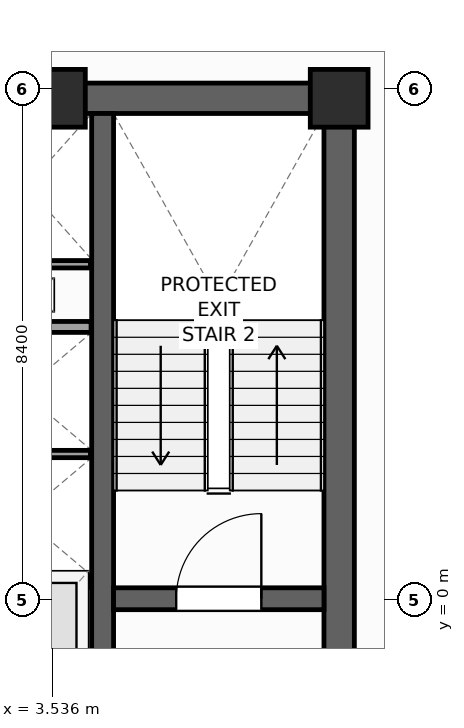
"""IFC4 building model, lengths in metres.
Left out: names, types, materials, properties, quantities, classifications, styles, units other than length and angle.
Written with IfcOpenShell. Run it as: python <this file> out.ifc"""

import sys

from ifc_helpers import new_model, si_unit, direction, frame, frame_2d, origin, origin_2d, place, context, subcontext, project, spatial, rectangle, extrude, source, transform, mapped, element, fill, save


model = new_model("IFC4")
c1 = context("Model", 3, precision=1e-05, world=origin(), true_north=direction((0.0, 1.0)))
c2 = subcontext(c1, "Body", "Model", "MODEL_VIEW")
j1 = project(units=[si_unit("LENGTHUNIT", "METRE"), si_unit("PLANEANGLEUNIT", "RADIAN")], contexts=[c1])
p1 = place(None, origin())
s1 = spatial("IfcSite", under=j1, at=p1, CompositionType="ELEMENT")
p2 = place(p1, origin())
s2 = spatial("IfcBuilding", under=s1, at=p2, CompositionType="ELEMENT")
p3 = place(p2, frame((0.0, 0.0, 221.2)))
s3 = spatial("IfcBuildingStorey", under=s2, at=p3, CompositionType="ELEMENT", Elevation=221.2)
p4 = place(p3, frame((-8.5, 8.25, 0.0), z_axis=(0.0, 0.0, 1.0), x_axis=(1.0, 0.0, 0.0)))
e1 = element("IfcWall", 1, at=p4, inside=s3, PredefinedType="SHEAR", context=c2, shape_type="SweptSolid", body=[
    extrude(rectangle(XDim=17.0, YDim=0.5, at=frame_2d((8.5, 0.0))), origin(), (0.0, 0.0, 1.0), 3.9),
])
p5 = place(p3, frame((8.25, -8.0, 0.0), z_axis=(0.0, 0.0, 1.0), x_axis=(0.0, 1.0, 0.0)))
e2 = element("IfcWall", 2, at=p5, inside=s3, PredefinedType="SHEAR", context=c2, shape_type="SweptSolid", body=[
    extrude(rectangle(XDim=16.0, YDim=0.5, at=frame_2d((8.0, 0.0))), origin(), (0.0, 0.0, 1.0), 3.9),
])
p6 = place(p5, frame((4.69, 0.0, 0.0)))
e3 = element("IfcOpeningElement", 3, at=p6, cuts=e2, PredefinedType="OPENING", context=c2, shape_type="SweptSolid", body=[
    extrude(rectangle(XDim=1.3, YDim=2.2, at=frame_2d((0.65, 1.1))), frame((0.0, 0.26, 0.0), z_axis=(0.0, -1.0, 0.0), x_axis=(1.0, 0.0, 0.0)), (0.0, 0.0, 1.0), 0.52),
])
p7 = place(p3, frame((4.36, -8.0, 0.0), z_axis=(0.0, 0.0, 1.0), x_axis=(0.0, 1.0, 0.0)))
e4 = element("IfcWall", 4, at=p7, inside=s3, PredefinedType="SHEAR", context=c2, shape_type="SweptSolid", body=[
    extrude(rectangle(XDim=16.0, YDim=0.36, at=frame_2d((8.0, 0.0))), origin(), (0.0, 0.0, 1.0), 3.9),
])
p8 = place(p3, frame((4.54, 0.02, 0.0), z_axis=(0.0, 0.0, 1.0), x_axis=(1.0, 0.0, 0.0)))
e5 = element("IfcWall", 5, at=p8, inside=s3, PredefinedType="SHEAR", context=c2, shape_type="SweptSolid", body=[
    extrude(rectangle(XDim=3.46, YDim=0.36, at=frame_2d((1.73, 0.0))), origin(), (0.0, 0.0, 1.0), 3.9),
])
p9 = place(p8, frame((1.03, 0.0, 0.0)))
e6 = element("IfcOpeningElement", 6, at=p9, cuts=e5, PredefinedType="OPENING", context=c2, shape_type="SweptSolid", body=[
    extrude(rectangle(XDim=1.4, YDim=2.2, at=frame_2d((0.7, 1.1))), frame((0.0, 0.19, 0.0), z_axis=(0.0, -1.0, 0.0), x_axis=(1.0, 0.0, 0.0)), (0.0, 0.0, 1.0), 0.38),
])
m1 = source(origin(), c2, "Body", "SweptSolid", [
    extrude(rectangle(XDim=0.95, YDim=0.95, at=origin_2d()), origin(), (0.0, 0.0, 1.0), 3.9),
])
for number, where, z_axis, x_axis in (
    (7, (8.25, 8.25, 0.0), (0.0, 0.0, 1.0), (1.0, 0.0, 0.0)),
    (8, (3.6, 8.25, 0.0), (0.0, 0.0, 1.0), (1.0, 0.0, 0.0)),
):
    element("IfcColumn", number, at=place(p3, frame(where, z_axis=z_axis, x_axis=x_axis)), inside=s3, PredefinedType="PILASTER", context=c2, shape_type="MappedRepresentation", body=[
        mapped(m1, transform((0.0, 0.0, 0.0), scale=1.0)),
    ])
p10 = place(p3, frame((6.733, -29.154, 0.0), z_axis=(0.0, 0.0, 1.0), x_axis=(0.629325378072, 0.77714192302, 0.0)))
e9 = element("IfcWall", 9, at=p10, inside=s3, PredefinedType="STANDARD", context=c2, shape_type="SweptSolid", body=[
    extrude(rectangle(XDim=36.84, YDim=0.34, at=frame_2d((18.42, 0.0))), origin(), (0.0, 0.0, 1.0), 2.96),
])
p11 = place(p10, frame((23.495, 0.0, 0.0)))
e10 = element("IfcOpeningElement", 10, at=p11, cuts=e9, PredefinedType="OPENING", context=c2, shape_type="SweptSolid", body=[
    extrude(rectangle(XDim=1.05, YDim=2.25, at=frame_2d((0.525, 1.125))), frame((0.0, 0.18, 0.0), z_axis=(0.0, -1.0, 0.0), x_axis=(1.0, 0.0, 0.0)), (0.0, 0.0, 1.0), 0.36),
])
p12 = place(p10, frame((3.721, 0.0, 0.48)))
e11 = element("IfcOpeningElement", 11, at=p12, cuts=e9, PredefinedType="OPENING", context=c2, shape_type="SweptSolid", body=[
    extrude(rectangle(XDim=1.4, YDim=2.4, at=frame_2d((0.7, 1.2))), frame((0.0, 0.18, 0.0), z_axis=(0.0, -1.0, 0.0), x_axis=(1.0, 0.0, 0.0)), (0.0, 0.0, 1.0), 0.36),
])
p13 = place(p10, frame((10.559, 0.0, 0.58)))
e12 = element("IfcOpeningElement", 12, at=p13, cuts=e9, PredefinedType="OPENING", context=c2, shape_type="SweptSolid", body=[
    extrude(rectangle(XDim=1.75, YDim=2.3, at=frame_2d((0.875, 1.15))), frame((0.0, 0.18, 0.0), z_axis=(0.0, -1.0, 0.0), x_axis=(1.0, 0.0, 0.0)), (0.0, 0.0, 1.0), 0.36),
])
p14 = place(p10, frame((16.058, 0.0, 0.58)))
e13 = element("IfcOpeningElement", 13, at=p14, cuts=e9, PredefinedType="OPENING", context=c2, shape_type="SweptSolid", body=[
    extrude(rectangle(XDim=1.75, YDim=2.3, at=frame_2d((0.875, 1.15))), frame((0.0, 0.18, 0.0), z_axis=(0.0, -1.0, 0.0), x_axis=(1.0, 0.0, 0.0)), (0.0, 0.0, 1.0), 0.36),
])
p15 = place(p10, frame((25.676, 0.0, 0.58)))
e14 = element("IfcOpeningElement", 14, at=p15, cuts=e9, PredefinedType="OPENING", context=c2, shape_type="SweptSolid", body=[
    extrude(rectangle(XDim=1.75, YDim=2.3, at=frame_2d((0.875, 1.15))), frame((0.0, 0.18, 0.0), z_axis=(0.0, -1.0, 0.0), x_axis=(1.0, 0.0, 0.0)), (0.0, 0.0, 1.0), 0.36),
])
p16 = place(p10, frame((31.732, 0.0, 0.48)))
e15 = element("IfcOpeningElement", 15, at=p16, cuts=e9, PredefinedType="OPENING", context=c2, shape_type="SweptSolid", body=[
    extrude(rectangle(XDim=1.4, YDim=2.4, at=frame_2d((0.7, 1.2))), frame((0.0, 0.18, 0.0), z_axis=(0.0, -1.0, 0.0), x_axis=(1.0, 0.0, 0.0)), (0.0, 0.0, 1.0), 0.36),
])
p17 = place(p3, frame((29.154, 6.733, 0.0), z_axis=(0.0, 0.0, 1.0), x_axis=(-0.77714192302, 0.629325378072, 0.0)))
e16 = element("IfcWall", 16, at=p17, inside=s3, PredefinedType="STANDARD", context=c2, shape_type="SweptSolid", body=[
    extrude(rectangle(XDim=36.84, YDim=0.34, at=frame_2d((18.42, 0.0))), origin(), (0.0, 0.0, 1.0), 2.96),
])
p18 = place(p17, frame((3.721, 0.0, 0.48)))
e17 = element("IfcOpeningElement", 17, at=p18, cuts=e16, PredefinedType="OPENING", context=c2, shape_type="SweptSolid", body=[
    extrude(rectangle(XDim=1.4, YDim=2.4, at=frame_2d((0.7, 1.2))), frame((0.0, 0.18, 0.0), z_axis=(0.0, -1.0, 0.0), x_axis=(1.0, 0.0, 0.0)), (0.0, 0.0, 1.0), 0.36),
])
p19 = place(p17, frame((9.809, 0.0, 0.58)))
e18 = element("IfcOpeningElement", 18, at=p19, cuts=e16, PredefinedType="OPENING", context=c2, shape_type="SweptSolid", body=[
    extrude(rectangle(XDim=1.75, YDim=2.3, at=frame_2d((0.875, 1.15))), frame((0.0, 0.18, 0.0), z_axis=(0.0, -1.0, 0.0), x_axis=(1.0, 0.0, 0.0)), (0.0, 0.0, 1.0), 0.36),
])
p20 = place(p17, frame((16.058, 0.0, 0.58)))
e19 = element("IfcOpeningElement", 19, at=p20, cuts=e16, PredefinedType="OPENING", context=c2, shape_type="SweptSolid", body=[
    extrude(rectangle(XDim=1.75, YDim=2.3, at=frame_2d((0.875, 1.15))), frame((0.0, 0.18, 0.0), z_axis=(0.0, -1.0, 0.0), x_axis=(1.0, 0.0, 0.0)), (0.0, 0.0, 1.0), 0.36),
])
p21 = place(p17, frame((24.176, 0.0, 0.58)))
e20 = element("IfcOpeningElement", 20, at=p21, cuts=e16, PredefinedType="OPENING", context=c2, shape_type="SweptSolid", body=[
    extrude(rectangle(XDim=1.75, YDim=2.3, at=frame_2d((0.875, 1.15))), frame((0.0, 0.18, 0.0), z_axis=(0.0, -1.0, 0.0), x_axis=(1.0, 0.0, 0.0)), (0.0, 0.0, 1.0), 0.36),
])
p22 = place(p17, frame((30.982, 0.0, 0.48)))
e21 = element("IfcOpeningElement", 21, at=p22, cuts=e16, PredefinedType="OPENING", context=c2, shape_type="SweptSolid", body=[
    extrude(rectangle(XDim=1.4, YDim=2.4, at=frame_2d((0.7, 1.2))), frame((0.0, 0.18, 0.0), z_axis=(0.0, -1.0, 0.0), x_axis=(1.0, 0.0, 0.0)), (0.0, 0.0, 1.0), 0.36),
])
for number, where, z_axis, x_axis in (
    (22, (1.89, 0.3, 0.0), (0.0, 0.0, 1.0), (1.0, 0.0, 0.0)),
    (23, (1.89, 4.49, 0.0), (0.0, 0.0, 1.0), (1.0, 0.0, 0.0)),
):
    element("IfcWall", number, at=place(p3, frame(where, z_axis=z_axis, x_axis=x_axis)), inside=s3, PredefinedType="PARTITIONING", context=c2, shape_type="SweptSolid", body=[
        extrude(rectangle(XDim=2.28, YDim=0.18, at=frame_2d((1.14, 0.0))), origin(), (0.0, 0.0, 1.0), 3.66),
    ])
p23 = place(p3, frame((1.9, 2.4, 0.0), z_axis=(0.0, 0.0, 1.0), x_axis=(1.0, 0.0, 0.0)))
e24 = element("IfcWall", 24, at=p23, inside=s3, PredefinedType="PARTITIONING", context=c2, shape_type="SweptSolid", body=[
    extrude(rectangle(XDim=2.26, YDim=0.12, at=frame_2d((1.13, 0.0))), origin(), (0.0, 0.0, 1.0), 3.66),
])
p24 = place(p3, frame((2.06, 5.52, 0.0), z_axis=(0.0, 0.0, 1.0), x_axis=(1.0, 0.0, 0.0)))
e25 = element("IfcWall", 25, at=p24, inside=s3, PredefinedType="PARTITIONING", context=c2, shape_type="SweptSolid", body=[
    extrude(rectangle(XDim=2.1, YDim=0.12, at=frame_2d((1.05, 0.0))), origin(), (0.0, 0.0, 1.0), 3.66),
])
m2 = source(origin(), c2, "Body", "SweptSolid", [
    extrude(rectangle(XDim=1.4, YDim=2.2, at=frame_2d((0.7, 1.1))), frame((0.0, 0.025, 0.0), z_axis=(0.0, -1.0, 0.0), x_axis=(1.0, 0.0, 0.0)), (0.0, 0.0, 1.0), 0.05),
])
p25 = place(p9, origin())
e26 = element("IfcDoor", 26, at=p25, inside=s3, OperationType="SINGLE_SWING_RIGHT", PredefinedType="DOOR", context=c2, shape_type="MappedRepresentation", body=[
    mapped(m2, transform((0.0, 0.0, 0.0), scale=1.0)),
])
fill(e6, e26)
save(model, sys.argv[1])
